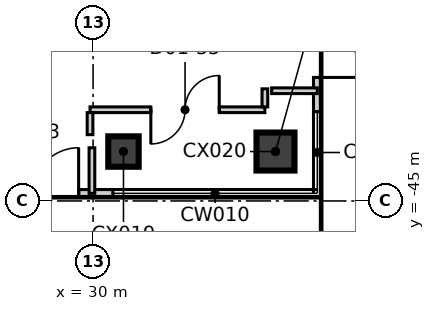
"""IFC4 building model, lengths in metres.
Left out: names, types, materials, properties, quantities, classifications, styles, units other than length and angle.
Written with IfcOpenShell. Run it as: python <this file> out.ifc"""

import sys

from ifc_helpers import new_model, si_unit, direction, frame, frame_2d, origin, origin_2d, place, context, subcontext, project, spatial, rectangle, extrude, element, fill, save


model = new_model("IFC4")
c1 = context("Model", 3, precision=1e-05, world=origin(), true_north=direction((0.0, 1.0)))
c2 = subcontext(c1, "Body", "Model", "MODEL_VIEW")
j1 = project(units=[si_unit("LENGTHUNIT", "METRE"), si_unit("PLANEANGLEUNIT", "RADIAN")], contexts=[c1])
p1 = place(None, origin())
s1 = spatial("IfcSite", under=j1, at=p1, CompositionType="ELEMENT")
p2 = place(p1, origin())
s2 = spatial("IfcBuilding", under=s1, at=p2, CompositionType="ELEMENT")
p3 = place(p2, frame((0.0, 0.0, 8.5)))
s3 = spatial("IfcBuildingStorey", under=s2, at=p3, CompositionType="ELEMENT", Elevation=8.5)
p4 = place(p3, frame((30.8, -43.7, -0.4), z_axis=(0.0, 0.0, 1.0), x_axis=(1.0, 0.0, 0.0)))
e1 = element("IfcColumn", 1, at=p4, inside=s3, PredefinedType="COLUMN", context=c2, shape_type="SweptSolid", body=[
    extrude(rectangle(XDim=0.8, YDim=0.8, at=origin_2d()), origin(), (0.0, 0.0, 1.0), 6.0),
])
p5 = place(p3, frame((34.8, -43.7, -0.4), z_axis=(0.0, 0.0, 1.0), x_axis=(1.0, 0.0, 0.0)))
e2 = element("IfcColumn", 2, at=p5, inside=s3, PredefinedType="COLUMN", context=c2, shape_type="SweptSolid", body=[
    extrude(rectangle(XDim=1.0, YDim=1.0, at=origin_2d()), origin(), (0.0, 0.0, 1.0), 6.0),
])
p6 = place(p3, frame((26.32, -44.8, 0.0), z_axis=(0.0, 0.0, 1.0), x_axis=(1.0, 0.0, 0.0)))
e3 = element("IfcWall", 3, at=p6, inside=s3, PredefinedType="ELEMENTEDWALL", context=c2, shape_type="SweptSolid", body=[
    extrude(rectangle(XDim=4.2, YDim=0.2, at=frame_2d((2.1, 0.0))), origin(), (0.0, 0.0, 1.0), 5.6),
])
p7 = place(p6, frame((0.9, 0.0, 0.0)))
e4 = element("IfcOpeningElement", 4, at=p7, cuts=e3, PredefinedType="OPENING", context=c2, shape_type="SweptSolid", body=[
    extrude(rectangle(XDim=2.4, YDim=2.4, at=frame_2d((1.2, 1.2))), frame((0.0, 0.11, 0.0), z_axis=(0.0, -1.0, 0.0), x_axis=(1.0, 0.0, 0.0)), (0.0, 0.0, 1.0), 0.22),
])
p8 = place(p3, frame((35.9, -42.65, 0.0), z_axis=(0.0, 0.0, 1.0), x_axis=(0.0, 1.0, 0.0)))
e5 = element("IfcWall", 5, at=p8, inside=s3, PredefinedType="ELEMENTEDWALL", context=c2, shape_type="SweptSolid", body=[
    extrude(rectangle(XDim=4.2, YDim=0.2, at=frame_2d((2.1, 0.0))), origin(), (0.0, 0.0, 1.0), 5.6),
])
p9 = place(p8, frame((0.9, 0.0, 0.0)))
e6 = element("IfcOpeningElement", 6, at=p9, cuts=e5, PredefinedType="OPENING", context=c2, shape_type="SweptSolid", body=[
    extrude(rectangle(XDim=2.4, YDim=2.4, at=frame_2d((1.2, 1.2))), frame((0.0, 0.11, 0.0), z_axis=(0.0, -1.0, 0.0), x_axis=(1.0, 0.0, 0.0)), (0.0, 0.0, 1.0), 0.22),
])
p10 = place(p3, frame((34.7, -42.1, 0.0), z_axis=(0.0, 0.0, 1.0), x_axis=(1.0, 0.0, 0.0)))
e7 = element("IfcWall", 7, at=p10, inside=s3, PredefinedType="PARTITIONING", context=c2, shape_type="SweptSolid", body=[
    extrude(rectangle(XDim=1.2, YDim=0.15, at=frame_2d((0.6, 0.0))), origin(), (0.0, 0.0, 1.0), 5.6),
])
p11 = place(p3, frame((29.92, -42.6, 0.0), z_axis=(0.0, 0.0, 1.0), x_axis=(1.0, 0.0, 0.0)))
e8 = element("IfcWall", 8, at=p11, inside=s3, PredefinedType="PARTITIONING", context=c2, shape_type="SweptSolid", body=[
    extrude(rectangle(XDim=4.601, YDim=0.15, at=frame_2d((2.301, 0.0))), origin(), (0.0, 0.0, 1.0), 5.6),
])
p12 = place(p11, frame((1.6, 0.0, 0.0)))
e9 = element("IfcOpeningElement", 9, at=p12, cuts=e8, PredefinedType="OPENING", context=c2, shape_type="SweptSolid", body=[
    extrude(rectangle(XDim=1.8, YDim=2.1, at=frame_2d((0.9, 1.05))), frame((0.0, 0.085, 0.0), z_axis=(0.0, -1.0, 0.0), x_axis=(1.0, 0.0, 0.0)), (0.0, 0.0, 1.0), 0.17),
])
p13 = place(p3, frame((29.97, -44.8, 0.0), z_axis=(0.0, 0.0, 1.0), x_axis=(0.0, 1.0, 0.0)))
e10 = element("IfcWall", 10, at=p13, inside=s3, PredefinedType="PARTITIONING", context=c2, shape_type="SweptSolid", body=[
    extrude(rectangle(XDim=1.2, YDim=0.15, at=frame_2d((0.6, 0.0))), origin(), (0.0, 0.0, 1.0), 5.6),
])
p14 = place(p3, frame((29.92, -43.256, 0.0), z_axis=(0.0, 0.0, 1.0), x_axis=(0.0, 1.0, 0.0)))
e11 = element("IfcWall", 11, at=p14, inside=s3, PredefinedType="PARTITIONING", context=c2, shape_type="SweptSolid", body=[
    extrude(rectangle(XDim=0.581, YDim=0.15, at=frame_2d((0.291, 0.0))), origin(), (0.0, 0.0, 1.0), 5.6),
])
p15 = place(p3, frame((34.521, -42.525, 0.0), z_axis=(0.0, 0.0, 1.0), x_axis=(0.0, 1.0, 0.0)))
e12 = element("IfcWall", 12, at=p15, inside=s3, PredefinedType="PARTITIONING", context=c2, shape_type="SweptSolid", body=[
    extrude(rectangle(XDim=0.475, YDim=0.15, at=frame_2d((0.237, 0.0))), origin(), (0.0, 0.0, 1.0), 5.6),
])
p16 = place(p7, frame((2.4, 0.0, 0.0), z_axis=(0.0, 0.0, 1.0), x_axis=(-1.0, 0.0, 0.0)))
e13 = element("IfcDoor", 13, at=p16, inside=s3, OperationType="DOUBLE_DOOR_SINGLE_SWING", PredefinedType="DOOR", context=c2, shape_type="SweptSolid", body=[
    extrude(rectangle(XDim=2.4, YDim=2.4, at=frame_2d((1.2, 1.2))), frame((0.0, 0.025, 0.0), z_axis=(0.0, -1.0, 0.0), x_axis=(1.0, 0.0, 0.0)), (0.0, 0.0, 1.0), 0.05),
])
fill(e4, e13)
p17 = place(p9, frame((2.4, 0.0, 0.0), z_axis=(0.0, 0.0, 1.0), x_axis=(-1.0, 0.0, 0.0)))
e14 = element("IfcDoor", 14, at=p17, inside=s3, OperationType="DOUBLE_DOOR_SINGLE_SWING", PredefinedType="DOOR", context=c2, shape_type="SweptSolid", body=[
    extrude(rectangle(XDim=2.4, YDim=2.4, at=frame_2d((1.2, 1.2))), frame((0.0, 0.025, 0.0), z_axis=(0.0, -1.0, 0.0), x_axis=(1.0, 0.0, 0.0)), (0.0, 0.0, 1.0), 0.05),
])
fill(e6, e14)
p18 = place(p12, origin())
e15 = element("IfcDoor", 15, at=p18, inside=s3, OperationType="DOUBLE_DOOR_SINGLE_SWING", PredefinedType="DOOR", context=c2, shape_type="SweptSolid", body=[
    extrude(rectangle(XDim=1.8, YDim=2.1, at=frame_2d((0.9, 1.05))), frame((0.0, 0.025, 0.0), z_axis=(0.0, -1.0, 0.0), x_axis=(1.0, 0.0, 0.0)), (0.0, 0.0, 1.0), 0.05),
])
fill(e9, e15)
save(model, sys.argv[1])
